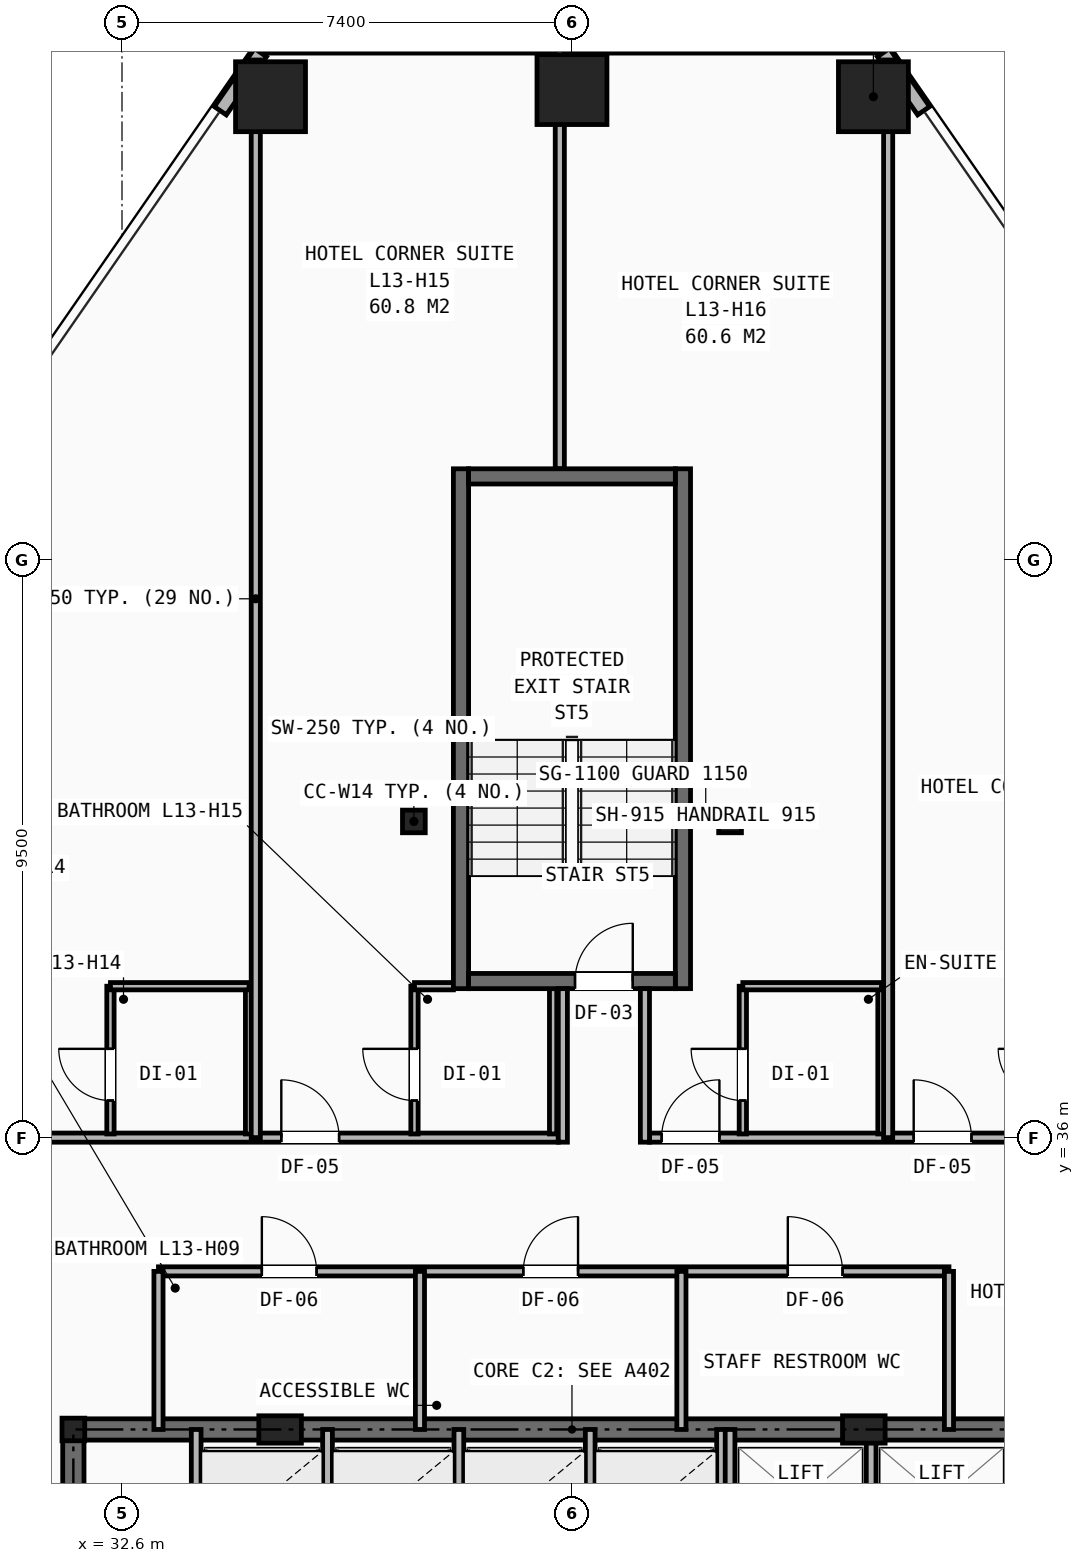
"""IFC4 building model, lengths in metres.
Left out: names, types, materials, properties, quantities, classifications, styles, units other than length and angle.
Written with IfcOpenShell. Run it as: python <this file> out.ifc"""

import sys

from ifc_helpers import new_model, si_unit, direction, frame, frame_2d, origin, origin_2d, place, context, subcontext, project, spatial, rectangle, hollow_rectangle, i_section, extrude, element, fill, save


model = new_model("IFC4")
c1 = context("Model", 3, precision=1e-05, world=origin(), true_north=direction((0.0, 1.0)))
c2 = subcontext(c1, "Body", "Model", "MODEL_VIEW")
j1 = project(units=[si_unit("LENGTHUNIT", "METRE"), si_unit("PLANEANGLEUNIT", "RADIAN")], contexts=[c1])
p1 = place(None, origin())
s1 = spatial("IfcSite", under=j1, at=p1, CompositionType="ELEMENT")
p2 = place(p1, origin())
s2 = spatial("IfcBuilding", under=s1, at=p2, CompositionType="ELEMENT")
p3 = place(p2, frame((0.0, 0.0, 49.6)))
s3 = spatial("IfcBuildingStorey", under=s2, at=p3, CompositionType="ELEMENT", Elevation=49.6)
for number, where, z_axis, x_axis in (
    (1, (31.8, 31.2, 0.0), (0.0, 0.0, 1.0), (1.0, 0.0, 0.0)),
    (2, (37.4, 41.2, 0.0), (0.0, 0.0, 1.0), (1.0, 0.0, 0.0)),
    (3, (42.6, 41.2, 0.0), (0.0, 0.0, 1.0), (1.0, 0.0, 0.0)),
):
    element("IfcColumn", number, at=place(p3, frame(where, z_axis=z_axis, x_axis=x_axis)), inside=s3, PredefinedType="COLUMN", context=c2, shape_type="SweptSolid", body=[
        extrude(i_section(OverallWidth=0.374, OverallDepth=0.372, WebThickness=0.016, FlangeThickness=0.026, at=origin_2d()), origin(), (0.0, 0.0, 1.0), 3.2),
    ])
for number, where, z_axis, x_axis in (
    (4, (35.2, 31.2, 0.0), (0.0, 0.0, 1.0), (1.0, 0.0, 0.0)),
    (5, (44.8, 31.2, 0.0), (0.0, 0.0, 1.0), (1.0, 0.0, 0.0)),
):
    element("IfcColumn", number, at=place(p3, frame(where, z_axis=z_axis, x_axis=x_axis)), inside=s3, PredefinedType="PILASTER", context=c2, shape_type="SweptSolid", body=[
        extrude(rectangle(XDim=0.7, YDim=0.45, at=origin_2d()), origin(), (0.0, 0.0, 1.0), 3.2),
    ])
for number, where, z_axis, x_axis in (
    (6, (44.958, 53.12, 0.0), (0.0, 0.0, 1.0), (1.0, 0.0, 0.0)),
    (7, (40.0, 53.237, 0.0), (0.0, 0.0, 1.0), (1.0, 0.0, 0.0)),
    (8, (35.042, 53.12, 0.0), (0.0, 0.0, 1.0), (1.0, 0.0, 0.0)),
):
    element("IfcColumn", number, at=place(p3, frame(where, z_axis=z_axis, x_axis=x_axis)), inside=s3, PredefinedType="COLUMN", context=c2, shape_type="SweptSolid", body=[
        extrude(hollow_rectangle(XDim=1.15, YDim=1.15, WallThickness=0.075, at=origin_2d()), origin(), (0.0, 0.0, 1.0), 3.2),
    ])
p4 = place(p3, frame((34.872, 53.957, 0.0), z_axis=(0.0, 0.0, 1.0), x_axis=(1.0, 0.0, 0.0)))
e9 = element("IfcWall", 9, at=p4, inside=s3, PredefinedType="SHEAR", context=c2, shape_type="SweptSolid", body=[
    extrude(rectangle(XDim=10.257, YDim=0.24, at=frame_2d((5.128, 0.0))), origin(), (0.0, 0.0, 1.0), 2.263),
])
for number, where, z_axis, x_axis in (
    (10, (34.878, 53.845, 0.0), (0.0, 0.0, 1.0), (-0.569, -0.822, 0.0)),
    (11, (45.784, 52.889, 0.0), (0.0, 0.0, 1.0), (-0.569, 0.822, 0.0)),
):
    element("IfcWall", number, at=place(p3, frame(where, z_axis=z_axis, x_axis=x_axis)), inside=s3, PredefinedType="SHEAR", context=c2, shape_type="SweptSolid", body=[
        extrude(rectangle(XDim=1.163, YDim=0.24, at=frame_2d((0.581, 0.0))), origin(), (0.0, 0.0, 1.0), 2.263),
    ])
p5 = place(p3, frame((31.8, 31.2, 0.0), z_axis=(0.0, 0.0, 1.0), x_axis=(1.0, 0.0, 0.0)))
e12 = element("IfcWall", 12, at=p5, inside=s3, PredefinedType="SHEAR", context=c2, shape_type="SweptSolid", body=[
    extrude(rectangle(XDim=16.4, YDim=0.35, at=frame_2d((8.2, 0.0))), origin(), (0.0, 0.0, 1.0), 2.98),
])
p6 = place(p3, frame((31.8, 16.4, 0.0), z_axis=(0.0, 0.0, 1.0), x_axis=(0.0, 1.0, 0.0)))
e13 = element("IfcWall", 13, at=p6, inside=s3, PredefinedType="SHEAR", context=c2, shape_type="SweptSolid", body=[
    extrude(rectangle(XDim=14.8, YDim=0.35, at=frame_2d((7.4, 0.0))), origin(), (0.0, 0.0, 1.0), 2.98),
])
p7 = place(p6, frame((11.0, 0.0, 0.0)))
e14 = element("IfcOpeningElement", 14, at=p7, cuts=e13, PredefinedType="OPENING", context=c2, shape_type="SweptSolid", body=[
    extrude(rectangle(XDim=1.1, YDim=2.15, at=frame_2d((0.55, 1.075))), frame((0.0, 0.185, 0.0), z_axis=(0.0, -1.0, 0.0), x_axis=(1.0, 0.0, 0.0)), (0.0, 0.0, 1.0), 0.37),
])
for number, where, z_axis, x_axis in (
    (15, (33.82, 29.02, 0.0), (0.0, 0.0, 1.0), (0.0, 1.0, 0.0)),
    (16, (35.98, 29.02, 0.0), (0.0, 0.0, 1.0), (0.0, 1.0, 0.0)),
    (17, (38.14, 29.02, 0.0), (0.0, 0.0, 1.0), (0.0, 1.0, 0.0)),
    (18, (40.3, 29.02, 0.0), (0.0, 0.0, 1.0), (0.0, 1.0, 0.0)),
    (19, (42.46, 29.02, 0.0), (0.0, 0.0, 1.0), (0.0, 1.0, 0.0)),
    (20, (42.6, 29.02, 0.0), (0.0, 0.0, 1.0), (0.0, 1.0, 0.0)),
    (21, (44.92, 29.02, 0.0), (0.0, 0.0, 1.0), (0.0, 1.0, 0.0)),
):
    element("IfcWall", number, at=place(p3, frame(where, z_axis=z_axis, x_axis=x_axis)), inside=s3, PredefinedType="SOLIDWALL", context=c2, shape_type="SweptSolid", body=[
        extrude(rectangle(XDim=2.18, YDim=0.16, at=frame_2d((1.09, 0.0))), origin(), (0.0, 0.0, 1.0), 2.431),
    ])
p8 = place(p3, frame((33.2, 33.8, 0.0), z_axis=(0.0, 0.0, 1.0), x_axis=(1.0, 0.0, 0.0)))
e22 = element("IfcWall", 22, at=p8, inside=s3, PredefinedType="PARTITIONING", context=c2, shape_type="SweptSolid", body=[
    extrude(rectangle(XDim=13.0, YDim=0.15, at=frame_2d((6.5, 0.0))), origin(), (0.0, 0.0, 1.0), 2.98),
])
p9 = place(p8, frame((1.7, 0.0, 0.0)))
e23 = element("IfcOpeningElement", 23, at=p9, cuts=e22, PredefinedType="OPENING", context=c2, shape_type="SweptSolid", body=[
    extrude(rectangle(XDim=0.9, YDim=2.1, at=frame_2d((0.45, 1.05))), frame((0.0, 0.085, 0.0), z_axis=(0.0, -1.0, 0.0), x_axis=(1.0, 0.0, 0.0)), (0.0, 0.0, 1.0), 0.17),
])
p10 = place(p8, frame((6.0, 0.0, 0.0)))
e24 = element("IfcOpeningElement", 24, at=p10, cuts=e22, PredefinedType="OPENING", context=c2, shape_type="SweptSolid", body=[
    extrude(rectangle(XDim=0.9, YDim=2.1, at=frame_2d((0.45, 1.05))), frame((0.0, 0.085, 0.0), z_axis=(0.0, -1.0, 0.0), x_axis=(1.0, 0.0, 0.0)), (0.0, 0.0, 1.0), 0.17),
])
p11 = place(p8, frame((10.35, 0.0, 0.0)))
e25 = element("IfcOpeningElement", 25, at=p11, cuts=e22, PredefinedType="OPENING", context=c2, shape_type="SweptSolid", body=[
    extrude(rectangle(XDim=0.9, YDim=2.1, at=frame_2d((0.45, 1.05))), frame((0.0, 0.085, 0.0), z_axis=(0.0, -1.0, 0.0), x_axis=(1.0, 0.0, 0.0)), (0.0, 0.0, 1.0), 0.17),
])
for number, where, z_axis, x_axis in (
    (26, (33.2, 31.2, 0.0), (0.0, 0.0, 1.0), (0.0, 1.0, 0.0)),
    (27, (46.2, 31.2, 0.0), (0.0, 0.0, 1.0), (0.0, 1.0, 0.0)),
    (28, (37.5, 31.2, 0.0), (0.0, 0.0, 1.0), (0.0, 1.0, 0.0)),
    (29, (41.8, 31.2, 0.0), (0.0, 0.0, 1.0), (0.0, 1.0, 0.0)),
):
    element("IfcWall", number, at=place(p3, frame(where, z_axis=z_axis, x_axis=x_axis)), inside=s3, PredefinedType="PARTITIONING", context=c2, shape_type="SweptSolid", body=[
        extrude(rectangle(XDim=2.6, YDim=0.15, at=frame_2d((1.3, 0.0))), origin(), (0.0, 0.0, 1.0), 2.431),
    ])
p12 = place(p3, frame((29.6, 36.0, 0.0), z_axis=(0.0, 0.0, 1.0), x_axis=(1.0, 0.0, 0.0)))
e30 = element("IfcWall", 30, at=p12, inside=s3, PredefinedType="PARTITIONING", context=c2, shape_type="SweptSolid", body=[
    extrude(rectangle(XDim=10.175, YDim=0.15, at=frame_2d((5.087, 0.0))), origin(), (0.0, 0.0, 1.0), 2.98),
])
p13 = place(p12, frame((0.57, 0.0, 0.0)))
e31 = element("IfcOpeningElement", 31, at=p13, cuts=e30, PredefinedType="OPENING", context=c2, shape_type="SweptSolid", body=[
    extrude(rectangle(XDim=0.95, YDim=2.1, at=frame_2d((0.475, 1.05))), frame((0.0, 0.085, 0.0), z_axis=(0.0, -1.0, 0.0), x_axis=(1.0, 0.0, 0.0)), (0.0, 0.0, 1.0), 0.17),
])
p14 = place(p12, frame((5.62, 0.0, 0.0)))
e32 = element("IfcOpeningElement", 32, at=p14, cuts=e30, PredefinedType="OPENING", context=c2, shape_type="SweptSolid", body=[
    extrude(rectangle(XDim=0.95, YDim=2.1, at=frame_2d((0.475, 1.05))), frame((0.0, 0.085, 0.0), z_axis=(0.0, -1.0, 0.0), x_axis=(1.0, 0.0, 0.0)), (0.0, 0.0, 1.0), 0.17),
])
p15 = place(p3, frame((41.275, 36.0, 0.0), z_axis=(0.0, 0.0, 1.0), x_axis=(1.0, 0.0, 0.0)))
e33 = element("IfcWall", 33, at=p15, inside=s3, PredefinedType="PARTITIONING", context=c2, shape_type="SweptSolid", body=[
    extrude(rectangle(XDim=9.125, YDim=0.15, at=frame_2d((4.562, 0.0))), origin(), (0.0, 0.0, 1.0), 2.513),
])
p16 = place(p15, frame((0.2, 0.0, 0.0)))
e34 = element("IfcOpeningElement", 34, at=p16, cuts=e33, PredefinedType="OPENING", context=c2, shape_type="SweptSolid", body=[
    extrude(rectangle(XDim=0.95, YDim=2.1, at=frame_2d((0.475, 1.05))), frame((0.0, 0.085, 0.0), z_axis=(0.0, -1.0, 0.0), x_axis=(1.0, 0.0, 0.0)), (0.0, 0.0, 1.0), 0.17),
])
p17 = place(p15, frame((4.345, 0.0, 0.0)))
e35 = element("IfcOpeningElement", 35, at=p17, cuts=e33, PredefinedType="OPENING", context=c2, shape_type="SweptSolid", body=[
    extrude(rectangle(XDim=0.95, YDim=2.1, at=frame_2d((0.475, 1.05))), frame((0.0, 0.085, 0.0), z_axis=(0.0, -1.0, 0.0), x_axis=(1.0, 0.0, 0.0)), (0.0, 0.0, 1.0), 0.17),
])
p18 = place(p3, frame((32.41, 36.06, 0.0), z_axis=(0.0, 0.0, 1.0), x_axis=(0.0, 1.0, 0.0)))
e36 = element("IfcWall", 36, at=p18, inside=s3, PredefinedType="PARTITIONING", context=c2, shape_type="SweptSolid", body=[
    extrude(rectangle(XDim=2.43, YDim=0.12, at=frame_2d((1.215, 0.0))), origin(), (0.0, 0.0, 1.0), 2.98),
])
p19 = place(p18, frame((0.55, 0.0, 0.0)))
e37 = element("IfcOpeningElement", 37, at=p19, cuts=e36, PredefinedType="OPENING", context=c2, shape_type="SweptSolid", body=[
    extrude(rectangle(XDim=0.85, YDim=2.05, at=frame_2d((0.425, 1.025))), frame((0.0, 0.07, 0.0), z_axis=(0.0, -1.0, 0.0), x_axis=(1.0, 0.0, 0.0)), (0.0, 0.0, 1.0), 0.14),
])
p20 = place(p3, frame((34.69, 36.06, 0.0), z_axis=(0.0, 0.0, 1.0), x_axis=(0.0, 1.0, 0.0)))
e38 = element("IfcWall", 38, at=p20, inside=s3, PredefinedType="PARTITIONING", context=c2, shape_type="SweptSolid", body=[
    extrude(rectangle(XDim=2.43, YDim=0.12, at=frame_2d((1.215, 0.0))), origin(), (0.0, 0.0, 1.0), 2.98),
])
p21 = place(p3, frame((32.41, 38.49, 0.0), z_axis=(0.0, 0.0, 1.0), x_axis=(1.0, 0.0, 0.0)))
e39 = element("IfcWall", 39, at=p21, inside=s3, PredefinedType="PARTITIONING", context=c2, shape_type="SweptSolid", body=[
    extrude(rectangle(XDim=2.28, YDim=0.12, at=frame_2d((1.14, 0.0))), origin(), (0.0, 0.0, 1.0), 2.98),
])
p22 = place(p3, frame((34.8, 36.0, 0.0), z_axis=(0.0, 0.0, 1.0), x_axis=(0.0, 1.0, 0.0)))
e40 = element("IfcWall", 40, at=p22, inside=s3, PredefinedType="PARTITIONING", context=c2, shape_type="SweptSolid", body=[
    extrude(rectangle(XDim=17.724, YDim=0.15, at=frame_2d((8.862, 0.0))), origin(), (0.0, 0.0, 1.0), 2.268),
])
p23 = place(p3, frame((37.41, 36.06, 0.0), z_axis=(0.0, 0.0, 1.0), x_axis=(0.0, 1.0, 0.0)))
e41 = element("IfcWall", 41, at=p23, inside=s3, PredefinedType="PARTITIONING", context=c2, shape_type="SweptSolid", body=[
    extrude(rectangle(XDim=2.43, YDim=0.12, at=frame_2d((1.215, 0.0))), origin(), (0.0, 0.0, 1.0), 2.98),
])
p24 = place(p23, frame((0.55, 0.0, 0.0)))
e42 = element("IfcOpeningElement", 42, at=p24, cuts=e41, PredefinedType="OPENING", context=c2, shape_type="SweptSolid", body=[
    extrude(rectangle(XDim=0.85, YDim=2.05, at=frame_2d((0.425, 1.025))), frame((0.0, 0.07, 0.0), z_axis=(0.0, -1.0, 0.0), x_axis=(1.0, 0.0, 0.0)), (0.0, 0.0, 1.0), 0.14),
])
p25 = place(p3, frame((39.69, 36.06, 0.0), z_axis=(0.0, 0.0, 1.0), x_axis=(0.0, 1.0, 0.0)))
e43 = element("IfcWall", 43, at=p25, inside=s3, PredefinedType="PARTITIONING", context=c2, shape_type="SweptSolid", body=[
    extrude(rectangle(XDim=2.39, YDim=0.12, at=frame_2d((1.195, 0.0))), origin(), (0.0, 0.0, 1.0), 2.98),
])
p26 = place(p3, frame((37.41, 38.49, 0.0), z_axis=(0.0, 0.0, 1.0), x_axis=(1.0, 0.0, 0.0)))
e44 = element("IfcWall", 44, at=p26, inside=s3, PredefinedType="PARTITIONING", context=c2, shape_type="SweptSolid", body=[
    extrude(rectangle(XDim=0.64, YDim=0.12, at=frame_2d((0.32, 0.0))), origin(), (0.0, 0.0, 1.0), 2.98),
])
p27 = place(p3, frame((39.8, 47.0, 0.0), z_axis=(0.0, 0.0, 1.0), x_axis=(0.0, 1.0, 0.0)))
e45 = element("IfcWall", 45, at=p27, inside=s3, PredefinedType="PARTITIONING", context=c2, shape_type="SweptSolid", body=[
    extrude(rectangle(XDim=6.952, YDim=0.15, at=frame_2d((3.476, 0.0))), origin(), (0.0, 0.0, 1.0), 2.268),
])
p28 = place(p3, frame((42.81, 36.06, 0.0), z_axis=(0.0, 0.0, 1.0), x_axis=(0.0, 1.0, 0.0)))
e46 = element("IfcWall", 46, at=p28, inside=s3, PredefinedType="PARTITIONING", context=c2, shape_type="SweptSolid", body=[
    extrude(rectangle(XDim=2.43, YDim=0.12, at=frame_2d((1.215, 0.0))), origin(), (0.0, 0.0, 1.0), 2.98),
])
p29 = place(p28, frame((0.55, 0.0, 0.0)))
e47 = element("IfcOpeningElement", 47, at=p29, cuts=e46, PredefinedType="OPENING", context=c2, shape_type="SweptSolid", body=[
    extrude(rectangle(XDim=0.85, YDim=2.05, at=frame_2d((0.425, 1.025))), frame((0.0, 0.07, 0.0), z_axis=(0.0, -1.0, 0.0), x_axis=(1.0, 0.0, 0.0)), (0.0, 0.0, 1.0), 0.14),
])
p30 = place(p3, frame((45.09, 36.06, 0.0), z_axis=(0.0, 0.0, 1.0), x_axis=(0.0, 1.0, 0.0)))
e48 = element("IfcWall", 48, at=p30, inside=s3, PredefinedType="PARTITIONING", context=c2, shape_type="SweptSolid", body=[
    extrude(rectangle(XDim=2.43, YDim=0.12, at=frame_2d((1.215, 0.0))), origin(), (0.0, 0.0, 1.0), 2.98),
])
p31 = place(p3, frame((42.81, 38.49, 0.0), z_axis=(0.0, 0.0, 1.0), x_axis=(1.0, 0.0, 0.0)))
e49 = element("IfcWall", 49, at=p31, inside=s3, PredefinedType="PARTITIONING", context=c2, shape_type="SweptSolid", body=[
    extrude(rectangle(XDim=2.28, YDim=0.12, at=frame_2d((1.14, 0.0))), origin(), (0.0, 0.0, 1.0), 2.98),
])
p32 = place(p3, frame((45.2, 36.0, 0.0), z_axis=(0.0, 0.0, 1.0), x_axis=(0.0, 1.0, 0.0)))
e50 = element("IfcWall", 50, at=p32, inside=s3, PredefinedType="PARTITIONING", context=c2, shape_type="SweptSolid", body=[
    extrude(rectangle(XDim=17.724, YDim=0.15, at=frame_2d((8.862, 0.0))), origin(), (0.0, 0.0, 1.0), 2.268),
])
for number, where, z_axis, x_axis in (
    (51, (38.175, 38.45, 0.0), (0.0, 0.0, 1.0), (0.0, 1.0, 0.0)),
    (52, (41.825, 38.45, 0.0), (0.0, 0.0, 1.0), (0.0, 1.0, 0.0)),
):
    element("IfcWall", number, at=place(p3, frame(where, z_axis=z_axis, x_axis=x_axis)), inside=s3, PredefinedType="SHEAR", context=c2, shape_type="SweptSolid", body=[
        extrude(rectangle(XDim=8.55, YDim=0.25, at=frame_2d((4.275, 0.0))), origin(), (0.0, 0.0, 1.0), 2.98),
    ])
p33 = place(p3, frame((38.3, 38.575, 0.0), z_axis=(0.0, 0.0, 1.0), x_axis=(1.0, 0.0, 0.0)))
e53 = element("IfcWall", 53, at=p33, inside=s3, PredefinedType="SHEAR", context=c2, shape_type="SweptSolid", body=[
    extrude(rectangle(XDim=3.4, YDim=0.25, at=frame_2d((1.7, 0.0))), origin(), (0.0, 0.0, 1.0), 2.98),
])
p34 = place(p33, frame((1.75, 0.0, 0.0)))
e54 = element("IfcOpeningElement", 54, at=p34, cuts=e53, PredefinedType="OPENING", context=c2, shape_type="SweptSolid", body=[
    extrude(rectangle(XDim=0.95, YDim=2.1, at=frame_2d((0.475, 1.05))), frame((0.0, 0.135, 0.0), z_axis=(0.0, -1.0, 0.0), x_axis=(1.0, 0.0, 0.0)), (0.0, 0.0, 1.0), 0.27),
])
p35 = place(p3, frame((38.3, 46.875, 0.0), z_axis=(0.0, 0.0, 1.0), x_axis=(1.0, 0.0, 0.0)))
e55 = element("IfcWall", 55, at=p35, inside=s3, PredefinedType="SHEAR", context=c2, shape_type="SweptSolid", body=[
    extrude(rectangle(XDim=3.4, YDim=0.25, at=frame_2d((1.7, 0.0))), origin(), (0.0, 0.0, 1.0), 2.98),
])
for number, where, z_axis, x_axis in (
    (56, (39.85, 35.925, 0.0), (0.0, 0.0, 1.0), (0.0, 1.0, 0.0)),
    (57, (41.2, 35.925, 0.0), (0.0, 0.0, 1.0), (0.0, 1.0, 0.0)),
):
    element("IfcWall", number, at=place(p3, frame(where, z_axis=z_axis, x_axis=x_axis)), inside=s3, PredefinedType="PARTITIONING", context=c2, shape_type="SweptSolid", body=[
        extrude(rectangle(XDim=2.525, YDim=0.15, at=frame_2d((1.262, 0.0))), origin(), (0.0, 0.0, 1.0), 2.98),
    ])
p36 = place(p9, origin())
e58 = element("IfcDoor", 58, at=p36, inside=s3, OperationType="SINGLE_SWING_LEFT", PredefinedType="DOOR", context=c2, shape_type="SweptSolid", body=[
    extrude(rectangle(XDim=0.9, YDim=2.1, at=frame_2d((0.45, 1.05))), frame((0.0, 0.025, 0.0), z_axis=(0.0, -1.0, 0.0), x_axis=(1.0, 0.0, 0.0)), (0.0, 0.0, 1.0), 0.05),
])
fill(e23, e58)
p37 = place(p10, origin())
e59 = element("IfcDoor", 59, at=p37, inside=s3, OperationType="SINGLE_SWING_RIGHT", PredefinedType="DOOR", context=c2, shape_type="SweptSolid", body=[
    extrude(rectangle(XDim=0.9, YDim=2.1, at=frame_2d((0.45, 1.05))), frame((0.0, 0.025, 0.0), z_axis=(0.0, -1.0, 0.0), x_axis=(1.0, 0.0, 0.0)), (0.0, 0.0, 1.0), 0.05),
])
fill(e24, e59)
p38 = place(p11, origin())
e60 = element("IfcDoor", 60, at=p38, inside=s3, OperationType="SINGLE_SWING_LEFT", PredefinedType="DOOR", context=c2, shape_type="SweptSolid", body=[
    extrude(rectangle(XDim=0.9, YDim=2.1, at=frame_2d((0.45, 1.05))), frame((0.0, 0.025, 0.0), z_axis=(0.0, -1.0, 0.0), x_axis=(1.0, 0.0, 0.0)), (0.0, 0.0, 1.0), 0.05),
])
fill(e25, e60)
p39 = place(p19, origin())
e61 = element("IfcDoor", 61, at=p39, inside=s3, OperationType="SINGLE_SWING_RIGHT", PredefinedType="DOOR", context=c2, shape_type="SweptSolid", body=[
    extrude(rectangle(XDim=0.85, YDim=2.05, at=frame_2d((0.425, 1.025))), frame((0.0, 0.025, 0.0), z_axis=(0.0, -1.0, 0.0), x_axis=(1.0, 0.0, 0.0)), (0.0, 0.0, 1.0), 0.05),
])
fill(e37, e61)
p40 = place(p14, origin())
e62 = element("IfcDoor", 62, at=p40, inside=s3, OperationType="SINGLE_SWING_LEFT", PredefinedType="DOOR", context=c2, shape_type="SweptSolid", body=[
    extrude(rectangle(XDim=0.95, YDim=2.1, at=frame_2d((0.475, 1.05))), frame((0.0, 0.025, 0.0), z_axis=(0.0, -1.0, 0.0), x_axis=(1.0, 0.0, 0.0)), (0.0, 0.0, 1.0), 0.05),
])
fill(e32, e62)
p41 = place(p24, origin())
e63 = element("IfcDoor", 63, at=p41, inside=s3, OperationType="SINGLE_SWING_RIGHT", PredefinedType="DOOR", context=c2, shape_type="SweptSolid", body=[
    extrude(rectangle(XDim=0.85, YDim=2.05, at=frame_2d((0.425, 1.025))), frame((0.0, 0.025, 0.0), z_axis=(0.0, -1.0, 0.0), x_axis=(1.0, 0.0, 0.0)), (0.0, 0.0, 1.0), 0.05),
])
fill(e42, e63)
p42 = place(p16, origin())
e64 = element("IfcDoor", 64, at=p42, inside=s3, OperationType="SINGLE_SWING_RIGHT", PredefinedType="DOOR", context=c2, shape_type="SweptSolid", body=[
    extrude(rectangle(XDim=0.95, YDim=2.1, at=frame_2d((0.475, 1.05))), frame((0.0, 0.025, 0.0), z_axis=(0.0, -1.0, 0.0), x_axis=(1.0, 0.0, 0.0)), (0.0, 0.0, 1.0), 0.05),
])
fill(e34, e64)
p43 = place(p29, origin())
e65 = element("IfcDoor", 65, at=p43, inside=s3, OperationType="SINGLE_SWING_RIGHT", PredefinedType="DOOR", context=c2, shape_type="SweptSolid", body=[
    extrude(rectangle(XDim=0.85, YDim=2.05, at=frame_2d((0.425, 1.025))), frame((0.0, 0.025, 0.0), z_axis=(0.0, -1.0, 0.0), x_axis=(1.0, 0.0, 0.0)), (0.0, 0.0, 1.0), 0.05),
])
fill(e47, e65)
p44 = place(p17, origin())
e66 = element("IfcDoor", 66, at=p44, inside=s3, OperationType="SINGLE_SWING_LEFT", PredefinedType="DOOR", context=c2, shape_type="SweptSolid", body=[
    extrude(rectangle(XDim=0.95, YDim=2.1, at=frame_2d((0.475, 1.05))), frame((0.0, 0.025, 0.0), z_axis=(0.0, -1.0, 0.0), x_axis=(1.0, 0.0, 0.0)), (0.0, 0.0, 1.0), 0.05),
])
fill(e35, e66)
p45 = place(p34, origin())
e67 = element("IfcDoor", 67, at=p45, inside=s3, OperationType="SINGLE_SWING_RIGHT", PredefinedType="DOOR", context=c2, shape_type="SweptSolid", body=[
    extrude(rectangle(XDim=0.95, YDim=2.1, at=frame_2d((0.475, 1.05))), frame((0.0, 0.025, 0.0), z_axis=(0.0, -1.0, 0.0), x_axis=(1.0, 0.0, 0.0)), (0.0, 0.0, 1.0), 0.05),
])
fill(e54, e67)
save(model, sys.argv[1])
